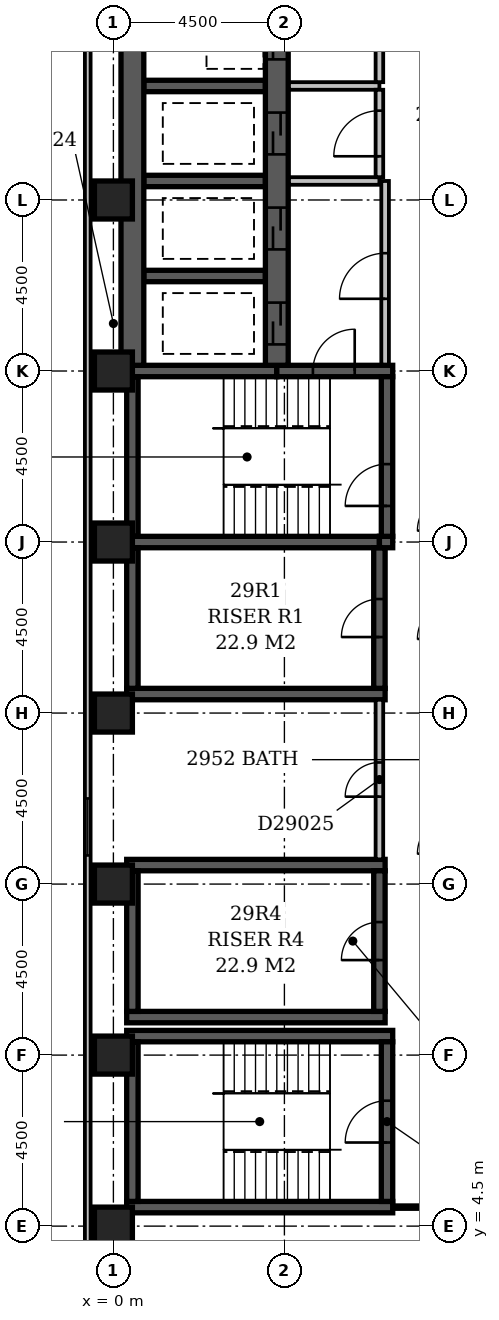
"""IFC4 building model, lengths in metres.
Left out: names, types, materials, properties, quantities, classifications, styles, units other than length and angle.
Written with IfcOpenShell. Run it as: python <this file> out.ifc"""

import sys

from ifc_helpers import new_model, si_unit, direction, frame, frame_2d, origin, origin_2d, place, context, subcontext, project, spatial, rectangle, extrude, element, fill, save


model = new_model("IFC4")
c1 = context("Model", 3, precision=1e-05, world=origin(), true_north=direction((0.0, 1.0)))
c2 = subcontext(c1, "Body", "Model", "MODEL_VIEW")
j1 = project(units=[si_unit("LENGTHUNIT", "METRE"), si_unit("PLANEANGLEUNIT", "RADIAN")], contexts=[c1])
p1 = place(None, origin())
s1 = spatial("IfcSite", under=j1, at=p1, CompositionType="ELEMENT")
p2 = place(p1, origin())
s2 = spatial("IfcBuilding", under=s1, at=p2, CompositionType="ELEMENT")
p3 = place(p2, frame((0.0, 0.0, 119.6)))
s3 = spatial("IfcBuildingStorey", under=s2, at=p3, CompositionType="ELEMENT", Elevation=119.6)
for number, where, z_axis, x_axis in (
    (1, (0.35, 5.0, -0.3), (0.0, 0.0, 1.0), (1.0, 0.0, 0.0)),
    (2, (0.35, 9.5, -0.3), (0.0, 0.0, 1.0), (1.0, 0.0, 0.0)),
):
    element("IfcWall", number, at=place(p3, frame(where, z_axis=z_axis, x_axis=x_axis)), inside=s3, PredefinedType="SHEAR", context=c2, shape_type="SweptSolid", body=[
        extrude(rectangle(XDim=7.0, YDim=0.3, at=frame_2d((3.5, 0.0))), origin(), (0.0, 0.0, 1.0), 3.6),
    ])
for number, where, z_axis, x_axis in (
    (3, (0.35, 10.0, -0.3), (0.0, 0.0, 1.0), (1.0, 0.0, 0.0)),
    (4, (0.35, 14.0, -0.3), (0.0, 0.0, 1.0), (1.0, 0.0, 0.0)),
    (5, (0.35, 18.5, -0.3), (0.0, 0.0, 1.0), (1.0, 0.0, 0.0)),
):
    element("IfcWall", number, at=place(p3, frame(where, z_axis=z_axis, x_axis=x_axis)), inside=s3, PredefinedType="SHEAR", context=c2, shape_type="SweptSolid", body=[
        extrude(rectangle(XDim=6.8, YDim=0.3, at=frame_2d((3.4, 0.0))), origin(), (0.0, 0.0, 1.0), 3.6),
    ])
p4 = place(p3, frame((0.35, 22.5, -0.3), z_axis=(0.0, 0.0, 1.0), x_axis=(1.0, 0.0, 0.0)))
e6 = element("IfcWall", 6, at=p4, inside=s3, PredefinedType="SHEAR", context=c2, shape_type="SweptSolid", body=[
    extrude(rectangle(XDim=6.65, YDim=0.3, at=frame_2d((3.325, 0.0))), origin(), (0.0, 0.0, 1.0), 3.6),
])
p5 = place(p3, frame((0.35, 27.0, -0.3), z_axis=(0.0, 0.0, 1.0), x_axis=(1.0, 0.0, 0.0)))
e7 = element("IfcWall", 7, at=p5, inside=s3, PredefinedType="SHEAR", context=c2, shape_type="SweptSolid", body=[
    extrude(rectangle(XDim=3.95, YDim=0.3, at=frame_2d((1.975, 0.0))), origin(), (0.0, 0.0, 1.0), 3.6),
])
p6 = place(p3, frame((0.5, 5.15, -0.3), z_axis=(0.0, 0.0, 1.0), x_axis=(0.0, 1.0, 0.0)))
e8 = element("IfcWall", 8, at=p6, inside=s3, PredefinedType="SHEAR", context=c2, shape_type="SweptSolid", body=[
    extrude(rectangle(XDim=4.2, YDim=0.3, at=frame_2d((2.1, 0.0))), origin(), (0.0, 0.0, 1.0), 3.6),
])
for number, where, z_axis, x_axis in (
    (9, (0.5, 10.15, -0.3), (0.0, 0.0, 1.0), (0.0, 1.0, 0.0)),
    (10, (0.5, 18.65, -0.3), (0.0, 0.0, 1.0), (0.0, 1.0, 0.0)),
):
    element("IfcWall", number, at=place(p3, frame(where, z_axis=z_axis, x_axis=x_axis)), inside=s3, PredefinedType="SHEAR", context=c2, shape_type="SweptSolid", body=[
        extrude(rectangle(XDim=3.7, YDim=0.3, at=frame_2d((1.85, 0.0))), origin(), (0.0, 0.0, 1.0), 3.6),
    ])
p7 = place(p3, frame((0.5, 22.65, -0.3), z_axis=(0.0, 0.0, 1.0), x_axis=(0.0, 1.0, 0.0)))
e11 = element("IfcWall", 11, at=p7, inside=s3, PredefinedType="SHEAR", context=c2, shape_type="SweptSolid", body=[
    extrude(rectangle(XDim=4.2, YDim=0.3, at=frame_2d((2.1, 0.0))), origin(), (0.0, 0.0, 1.0), 3.6),
])
p8 = place(p3, frame((0.5, 27.15, -0.3), z_axis=(0.0, 0.0, 1.0), x_axis=(0.0, 1.0, 0.0)))
e12 = element("IfcWall", 12, at=p8, inside=s3, PredefinedType="SHEAR", context=c2, shape_type="SweptSolid", body=[
    extrude(rectangle(XDim=22.05, YDim=0.6, at=frame_2d((11.025, 0.0))), origin(), (0.0, 0.0, 1.0), 3.6),
])
for number, where, z_axis, x_axis in (
    (13, (0.8, 29.5, -0.3), (0.0, 0.0, 1.0), (1.0, 0.0, 0.0)),
    (14, (0.8, 32.0, -0.3), (0.0, 0.0, 1.0), (1.0, 0.0, 0.0)),
    (15, (0.8, 34.5, -0.3), (0.0, 0.0, 1.0), (1.0, 0.0, 0.0)),
):
    element("IfcWall", number, at=place(p3, frame(where, z_axis=z_axis, x_axis=x_axis)), inside=s3, PredefinedType="SHEAR", context=c2, shape_type="SweptSolid", body=[
        extrude(rectangle(XDim=3.2, YDim=0.3, at=frame_2d((1.6, 0.0))), origin(), (0.0, 0.0, 1.0), 3.6),
    ])
p9 = place(p3, frame((4.3, 27.0, -0.3), z_axis=(0.0, 0.0, 1.0), x_axis=(1.0, 0.0, 0.0)))
e16 = element("IfcWall", 16, at=p9, inside=s3, PredefinedType="SHEAR", context=c2, shape_type="SweptSolid", body=[
    extrude(rectangle(XDim=3.05, YDim=0.3, at=frame_2d((1.525, 0.0))), origin(), (0.0, 0.0, 1.0), 3.6),
])
p10 = place(p9, frame((0.95, 0.0, 0.3)))
e17 = element("IfcOpeningElement", 17, at=p10, cuts=e16, PredefinedType="OPENING", context=c2, shape_type="SweptSolid", body=[
    extrude(rectangle(XDim=1.1, YDim=2.1, at=frame_2d((0.55, 1.05))), frame((0.0, 0.162, 0.0), z_axis=(0.0, -1.0, 0.0), x_axis=(1.0, 0.0, 0.0)), (0.0, 0.0, 1.0), 0.324),
])
p11 = place(p3, frame((4.3, 27.15, -0.3), z_axis=(0.0, 0.0, 1.0), x_axis=(0.0, 1.0, 0.0)))
e18 = element("IfcWall", 18, at=p11, inside=s3, PredefinedType="SHEAR", context=c2, shape_type="SweptSolid", body=[
    extrude(rectangle(XDim=22.05, YDim=0.6, at=frame_2d((11.025, 0.0))), origin(), (0.0, 0.0, 1.0), 3.6),
])
p12 = place(p11, frame((3.05, 0.0, 0.3)))
e19 = element("IfcOpeningElement", 19, at=p12, cuts=e18, PredefinedType="OPENING", context=c2, shape_type="SweptSolid", body=[
    extrude(rectangle(XDim=1.1, YDim=2.1, at=frame_2d((0.55, 1.05))), frame((0.0, 0.312, 0.0), z_axis=(0.0, -1.0, 0.0), x_axis=(1.0, 0.0, 0.0)), (0.0, 0.0, 1.0), 0.624),
])
p13 = place(p11, frame((0.55, 0.0, 0.3)))
e20 = element("IfcOpeningElement", 20, at=p13, cuts=e18, PredefinedType="OPENING", context=c2, shape_type="SweptSolid", body=[
    extrude(rectangle(XDim=1.1, YDim=2.1, at=frame_2d((0.55, 1.05))), frame((0.0, 0.312, 0.0), z_axis=(0.0, -1.0, 0.0), x_axis=(1.0, 0.0, 0.0)), (0.0, 0.0, 1.0), 0.624),
])
p14 = place(p11, frame((20.55, 0.0, 0.3)))
e21 = element("IfcOpeningElement", 21, at=p14, cuts=e18, PredefinedType="OPENING", context=c2, shape_type="SweptSolid", body=[
    extrude(rectangle(XDim=1.1, YDim=2.1, at=frame_2d((0.55, 1.05))), frame((0.0, 0.312, 0.0), z_axis=(0.0, -1.0, 0.0), x_axis=(1.0, 0.0, 0.0)), (0.0, 0.0, 1.0), 0.624),
])
p15 = place(p11, frame((18.05, 0.0, 0.3)))
e22 = element("IfcOpeningElement", 22, at=p15, cuts=e18, PredefinedType="OPENING", context=c2, shape_type="SweptSolid", body=[
    extrude(rectangle(XDim=1.1, YDim=2.1, at=frame_2d((0.55, 1.05))), frame((0.0, 0.312, 0.0), z_axis=(0.0, -1.0, 0.0), x_axis=(1.0, 0.0, 0.0)), (0.0, 0.0, 1.0), 0.624),
])
p16 = place(p11, frame((15.55, 0.0, 0.3)))
e23 = element("IfcOpeningElement", 23, at=p16, cuts=e18, PredefinedType="OPENING", context=c2, shape_type="SweptSolid", body=[
    extrude(rectangle(XDim=1.1, YDim=2.1, at=frame_2d((0.55, 1.05))), frame((0.0, 0.312, 0.0), z_axis=(0.0, -1.0, 0.0), x_axis=(1.0, 0.0, 0.0)), (0.0, 0.0, 1.0), 0.624),
])
p17 = place(p11, frame((13.05, 0.0, 0.3)))
e24 = element("IfcOpeningElement", 24, at=p17, cuts=e18, PredefinedType="OPENING", context=c2, shape_type="SweptSolid", body=[
    extrude(rectangle(XDim=1.1, YDim=2.1, at=frame_2d((0.55, 1.05))), frame((0.0, 0.312, 0.0), z_axis=(0.0, -1.0, 0.0), x_axis=(1.0, 0.0, 0.0)), (0.0, 0.0, 1.0), 0.624),
])
p18 = place(p11, frame((10.55, 0.0, 0.3)))
e25 = element("IfcOpeningElement", 25, at=p18, cuts=e18, PredefinedType="OPENING", context=c2, shape_type="SweptSolid", body=[
    extrude(rectangle(XDim=1.1, YDim=2.1, at=frame_2d((0.55, 1.05))), frame((0.0, 0.312, 0.0), z_axis=(0.0, -1.0, 0.0), x_axis=(1.0, 0.0, 0.0)), (0.0, 0.0, 1.0), 0.624),
])
p19 = place(p11, frame((8.05, 0.0, 0.3)))
e26 = element("IfcOpeningElement", 26, at=p19, cuts=e18, PredefinedType="OPENING", context=c2, shape_type="SweptSolid", body=[
    extrude(rectangle(XDim=1.1, YDim=2.1, at=frame_2d((0.55, 1.05))), frame((0.0, 0.312, 0.0), z_axis=(0.0, -1.0, 0.0), x_axis=(1.0, 0.0, 0.0)), (0.0, 0.0, 1.0), 0.624),
])
p20 = place(p11, frame((5.55, 0.0, 0.3)))
e27 = element("IfcOpeningElement", 27, at=p20, cuts=e18, PredefinedType="OPENING", context=c2, shape_type="SweptSolid", body=[
    extrude(rectangle(XDim=1.1, YDim=2.1, at=frame_2d((0.55, 1.05))), frame((0.0, 0.312, 0.0), z_axis=(0.0, -1.0, 0.0), x_axis=(1.0, 0.0, 0.0)), (0.0, 0.0, 1.0), 0.624),
])
p21 = place(p3, frame((7.0, 10.15, -0.3), z_axis=(0.0, 0.0, 1.0), x_axis=(0.0, 1.0, 0.0)))
e28 = element("IfcWall", 28, at=p21, inside=s3, PredefinedType="SHEAR", context=c2, shape_type="SweptSolid", body=[
    extrude(rectangle(XDim=3.7, YDim=0.3, at=frame_2d((1.85, 0.0))), origin(), (0.0, 0.0, 1.0), 3.6),
])
p22 = place(p21, frame((1.35, 0.0, 0.3)))
e29 = element("IfcOpeningElement", 29, at=p22, cuts=e28, PredefinedType="OPENING", context=c2, shape_type="SweptSolid", body=[
    extrude(rectangle(XDim=1.0, YDim=2.1, at=frame_2d((0.5, 1.05))), frame((0.0, 0.162, 0.0), z_axis=(0.0, -1.0, 0.0), x_axis=(1.0, 0.0, 0.0)), (0.0, 0.0, 1.0), 0.324),
])
p23 = place(p3, frame((7.0, 18.65, -0.3), z_axis=(0.0, 0.0, 1.0), x_axis=(0.0, 1.0, 0.0)))
e30 = element("IfcWall", 30, at=p23, inside=s3, PredefinedType="SHEAR", context=c2, shape_type="SweptSolid", body=[
    extrude(rectangle(XDim=3.7, YDim=0.3, at=frame_2d((1.85, 0.0))), origin(), (0.0, 0.0, 1.0), 3.6),
])
p24 = place(p23, frame((1.35, 0.0, 0.3)))
e31 = element("IfcOpeningElement", 31, at=p24, cuts=e30, PredefinedType="OPENING", context=c2, shape_type="SweptSolid", body=[
    extrude(rectangle(XDim=1.0, YDim=2.1, at=frame_2d((0.5, 1.05))), frame((0.0, 0.162, 0.0), z_axis=(0.0, -1.0, 0.0), x_axis=(1.0, 0.0, 0.0)), (0.0, 0.0, 1.0), 0.324),
])
p25 = place(p3, frame((7.0, 22.5, -0.3), z_axis=(0.0, 0.0, 1.0), x_axis=(1.0, 0.0, 0.0)))
e32 = element("IfcWall", 32, at=p25, inside=s3, PredefinedType="SHEAR", context=c2, shape_type="SweptSolid", body=[
    extrude(rectangle(XDim=0.35, YDim=0.3, at=frame_2d((0.175, 0.0))), origin(), (0.0, 0.0, 1.0), 3.6),
])
p26 = place(p3, frame((7.2, 5.15, -0.3), z_axis=(0.0, 0.0, 1.0), x_axis=(0.0, 1.0, 0.0)))
e33 = element("IfcWall", 33, at=p26, inside=s3, PredefinedType="SHEAR", context=c2, shape_type="SweptSolid", body=[
    extrude(rectangle(XDim=4.2, YDim=0.3, at=frame_2d((2.1, 0.0))), origin(), (0.0, 0.0, 1.0), 3.6),
])
p27 = place(p26, frame((1.55, 0.0, 0.3)))
e34 = element("IfcOpeningElement", 34, at=p27, cuts=e33, PredefinedType="OPENING", context=c2, shape_type="SweptSolid", body=[
    extrude(rectangle(XDim=1.1, YDim=2.1, at=frame_2d((0.55, 1.05))), frame((0.0, 0.162, 0.0), z_axis=(0.0, -1.0, 0.0), x_axis=(1.0, 0.0, 0.0)), (0.0, 0.0, 1.0), 0.324),
])
p28 = place(p3, frame((7.2, 22.65, -0.3), z_axis=(0.0, 0.0, 1.0), x_axis=(0.0, 1.0, 0.0)))
e35 = element("IfcWall", 35, at=p28, inside=s3, PredefinedType="SHEAR", context=c2, shape_type="SweptSolid", body=[
    extrude(rectangle(XDim=4.2, YDim=0.3, at=frame_2d((2.1, 0.0))), origin(), (0.0, 0.0, 1.0), 3.6),
])
p29 = place(p28, frame((0.8, 0.0, 0.3)))
e36 = element("IfcOpeningElement", 36, at=p29, cuts=e35, PredefinedType="OPENING", context=c2, shape_type="SweptSolid", body=[
    extrude(rectangle(XDim=1.1, YDim=2.1, at=frame_2d((0.55, 1.05))), frame((0.0, 0.162, 0.0), z_axis=(0.0, -1.0, 0.0), x_axis=(1.0, 0.0, 0.0)), (0.0, 0.0, 1.0), 0.324),
])
for number, where, z_axis, x_axis in (
    (37, (0.0, 4.5, -0.3), (0.0, 0.0, 1.0), (1.0, 0.0, 0.0)),
    (38, (0.0, 9.0, -0.3), (0.0, 0.0, 1.0), (1.0, 0.0, 0.0)),
    (39, (0.0, 13.5, -0.3), (0.0, 0.0, 1.0), (1.0, 0.0, 0.0)),
    (40, (0.0, 18.0, -0.3), (0.0, 0.0, 1.0), (1.0, 0.0, 0.0)),
    (41, (0.0, 22.5, -0.3), (0.0, 0.0, 1.0), (1.0, 0.0, 0.0)),
    (42, (0.0, 27.0, -0.3), (0.0, 0.0, 1.0), (1.0, 0.0, 0.0)),
    (43, (0.0, 31.5, -0.3), (0.0, 0.0, 1.0), (1.0, 0.0, 0.0)),
):
    element("IfcColumn", number, at=place(p3, frame(where, z_axis=z_axis, x_axis=x_axis)), inside=s3, PredefinedType="COLUMN", context=c2, shape_type="SweptSolid", body=[
        extrude(rectangle(XDim=1.0, YDim=1.0, at=origin_2d()), origin(), (0.0, 0.0, 1.0), 3.6),
    ])
p30 = place(p3, frame((-0.675, 59.1, 0.0), z_axis=(0.0, 0.0, 1.0), x_axis=(0.0, -1.0, 0.0)))
e44 = element("IfcWall", 44, at=p30, inside=s3, PredefinedType="STANDARD", context=c2, shape_type="SweptSolid", body=[
    extrude(rectangle(XDim=55.35, YDim=0.15, at=frame_2d((27.675, 0.0))), origin(), (0.0, 0.0, 1.0), 2.7),
])
p31 = place(p30, frame((43.347, 0.0, 0.6)))
e45 = element("IfcOpeningElement", 45, at=p31, cuts=e44, PredefinedType="OPENING", context=c2, shape_type="SweptSolid", body=[
    extrude(rectangle(XDim=1.5, YDim=1.8, at=frame_2d((0.75, 0.9))), frame((0.0, 0.087, 0.0), z_axis=(0.0, -1.0, 0.0), x_axis=(1.0, 0.0, 0.0)), (0.0, 0.0, 1.0), 0.174),
])
p32 = place(p3, frame((4.62, 34.5, 0.0), z_axis=(0.0, 0.0, 1.0), x_axis=(1.0, 0.0, 0.0)))
e46 = element("IfcWall", 46, at=p32, inside=s3, PredefinedType="PARTITIONING", context=c2, shape_type="SweptSolid", body=[
    extrude(rectangle(XDim=2.38, YDim=0.2, at=frame_2d((1.19, 0.0))), origin(), (0.0, 0.0, 1.0), 3.3),
])
p33 = place(p3, frame((7.0, 34.6, 0.0), z_axis=(0.0, 0.0, 1.0), x_axis=(0.0, 1.0, 0.0)))
e47 = element("IfcWall", 47, at=p33, inside=s3, PredefinedType="PARTITIONING", context=c2, shape_type="SweptSolid", body=[
    extrude(rectangle(XDim=14.9, YDim=0.2, at=frame_2d((7.45, 0.0))), origin(), (0.0, 0.0, 1.0), 3.3),
])
p34 = place(p33, frame((2.8, 0.0, 0.0)))
e48 = element("IfcOpeningElement", 48, at=p34, cuts=e47, PredefinedType="OPENING", context=c2, shape_type="SweptSolid", body=[
    extrude(rectangle(XDim=1.2, YDim=2.1, at=frame_2d((0.6, 1.05))), frame((0.0, 0.112, 0.0), z_axis=(0.0, -1.0, 0.0), x_axis=(1.0, 0.0, 0.0)), (0.0, 0.0, 1.0), 0.224),
])
p35 = place(p33, frame((9.8, 0.0, 0.0)))
e49 = element("IfcOpeningElement", 49, at=p35, cuts=e47, PredefinedType="OPENING", context=c2, shape_type="SweptSolid", body=[
    extrude(rectangle(XDim=1.2, YDim=2.1, at=frame_2d((0.6, 1.05))), frame((0.0, 0.112, 0.0), z_axis=(0.0, -1.0, 0.0), x_axis=(1.0, 0.0, 0.0)), (0.0, 0.0, 1.0), 0.224),
])
p36 = place(p3, frame((4.62, 32.0, 0.0), z_axis=(0.0, 0.0, 1.0), x_axis=(1.0, 0.0, 0.0)))
e50 = element("IfcWall", 50, at=p36, inside=s3, PredefinedType="PARTITIONING", context=c2, shape_type="SweptSolid", body=[
    extrude(rectangle(XDim=2.38, YDim=0.2, at=frame_2d((1.19, 0.0))), origin(), (0.0, 0.0, 1.0), 3.3),
])
p37 = place(p3, frame((7.0, 32.1, 0.0), z_axis=(0.0, 0.0, 1.0), x_axis=(0.0, 1.0, 0.0)))
e51 = element("IfcWall", 51, at=p37, inside=s3, PredefinedType="PARTITIONING", context=c2, shape_type="SweptSolid", body=[
    extrude(rectangle(XDim=2.3, YDim=0.2, at=frame_2d((1.15, 0.0))), origin(), (0.0, 0.0, 1.0), 3.3),
])
p38 = place(p37, frame((0.55, 0.0, 0.0)))
e52 = element("IfcOpeningElement", 52, at=p38, cuts=e51, PredefinedType="OPENING", context=c2, shape_type="SweptSolid", body=[
    extrude(rectangle(XDim=1.2, YDim=2.1, at=frame_2d((0.6, 1.05))), frame((0.0, 0.112, 0.0), z_axis=(0.0, -1.0, 0.0), x_axis=(1.0, 0.0, 0.0)), (0.0, 0.0, 1.0), 0.224),
])
p39 = place(p3, frame((7.15, 27.17, 0.0), z_axis=(0.0, 0.0, 1.0), x_axis=(0.0, 1.0, 0.0)))
e53 = element("IfcWall", 53, at=p39, inside=s3, PredefinedType="PARTITIONING", context=c2, shape_type="SweptSolid", body=[
    extrude(rectangle(XDim=4.83, YDim=0.2, at=frame_2d((2.415, 0.0))), origin(), (0.0, 0.0, 1.0), 3.3),
])
p40 = place(p39, frame((1.73, 0.0, 0.0)))
e54 = element("IfcOpeningElement", 54, at=p40, cuts=e53, PredefinedType="OPENING", context=c2, shape_type="SweptSolid", body=[
    extrude(rectangle(XDim=1.2, YDim=2.1, at=frame_2d((0.6, 1.05))), frame((0.0, 0.112, 0.0), z_axis=(0.0, -1.0, 0.0), x_axis=(1.0, 0.0, 0.0)), (0.0, 0.0, 1.0), 0.224),
])
p41 = place(p3, frame((0.0, 4.5, 0.0), z_axis=(0.0, 0.0, 1.0), x_axis=(0.0, 1.0, 0.0)))
e55 = element("IfcWall", 55, at=p41, inside=s3, PredefinedType="PARTITIONING", context=c2, shape_type="SweptSolid", body=[
    extrude(rectangle(XDim=0.5, YDim=0.1, at=frame_2d((0.25, 0.0))), origin(), (0.0, 0.0, 1.0), 2.7),
])
p42 = place(p3, frame((7.349, 5.0, 0.0), z_axis=(0.0, 0.0, 1.0), x_axis=(1.0, 0.0, 0.0)))
e56 = element("IfcWall", 56, at=p42, inside=s3, PredefinedType="PARTITIONING", context=c2, shape_type="SweptSolid", body=[
    extrude(rectangle(XDim=1.551, YDim=0.1, at=frame_2d((0.775, 0.0))), origin(), (0.0, 0.0, 1.0), 3.3),
])
p43 = place(p3, frame((7.0, 14.15, 0.0), z_axis=(0.0, 0.0, 1.0), x_axis=(0.0, 1.0, 0.0)))
e57 = element("IfcWall", 57, at=p43, inside=s3, PredefinedType="PARTITIONING", context=c2, shape_type="SweptSolid", body=[
    extrude(rectangle(XDim=4.2, YDim=0.2, at=frame_2d((2.1, 0.0))), origin(), (0.0, 0.0, 1.0), 3.3),
])
p44 = place(p43, frame((1.65, 0.0, 0.0)))
e58 = element("IfcOpeningElement", 58, at=p44, cuts=e57, PredefinedType="OPENING", context=c2, shape_type="SweptSolid", body=[
    extrude(rectangle(XDim=0.9, YDim=2.1, at=frame_2d((0.45, 1.05))), frame((0.0, 0.112, 0.0), z_axis=(0.0, -1.0, 0.0), x_axis=(1.0, 0.0, 0.0)), (0.0, 0.0, 1.0), 0.224),
])
p45 = place(p31, origin())
e59 = element("IfcWindow", 59, at=p45, inside=s3, PartitioningType="SINGLE_PANEL", PredefinedType="WINDOW", context=c2, shape_type="SweptSolid", body=[
    extrude(rectangle(XDim=1.5, YDim=1.8, at=frame_2d((0.75, 0.9))), frame((0.0, 0.03, 0.0), z_axis=(0.0, -1.0, 0.0), x_axis=(1.0, 0.0, 0.0)), (0.0, 0.0, 1.0), 0.06),
])
fill(e45, e59)
p46 = place(p40, origin())
e60 = element("IfcDoor", 60, at=p46, inside=s3, OperationType="SINGLE_SWING_LEFT", PredefinedType="DOOR", context=c2, shape_type="SweptSolid", body=[
    extrude(rectangle(XDim=1.2, YDim=2.1, at=frame_2d((0.6, 1.05))), frame((0.0, 0.025, 0.0), z_axis=(0.0, -1.0, 0.0), x_axis=(1.0, 0.0, 0.0)), (0.0, 0.0, 1.0), 0.05),
])
fill(e54, e60)
p47 = place(p12, origin())
e61 = element("IfcDoor", 61, at=p47, inside=s3, OperationType="SLIDING_TO_LEFT", PredefinedType="DOOR", context=c2, shape_type="SweptSolid", body=[
    extrude(rectangle(XDim=1.1, YDim=2.1, at=frame_2d((0.55, 1.05))), frame((0.0, 0.025, 0.0), z_axis=(0.0, -1.0, 0.0), x_axis=(1.0, 0.0, 0.0)), (0.0, 0.0, 1.0), 0.05),
])
fill(e19, e61)
p48 = place(p13, origin())
e62 = element("IfcDoor", 62, at=p48, inside=s3, OperationType="SLIDING_TO_LEFT", PredefinedType="DOOR", context=c2, shape_type="SweptSolid", body=[
    extrude(rectangle(XDim=1.1, YDim=2.1, at=frame_2d((0.55, 1.05))), frame((0.0, 0.025, 0.0), z_axis=(0.0, -1.0, 0.0), x_axis=(1.0, 0.0, 0.0)), (0.0, 0.0, 1.0), 0.05),
])
fill(e20, e62)
p49 = place(p19, origin())
e63 = element("IfcDoor", 63, at=p49, inside=s3, OperationType="SLIDING_TO_LEFT", PredefinedType="DOOR", context=c2, shape_type="SweptSolid", body=[
    extrude(rectangle(XDim=1.1, YDim=2.1, at=frame_2d((0.55, 1.05))), frame((0.0, 0.025, 0.0), z_axis=(0.0, -1.0, 0.0), x_axis=(1.0, 0.0, 0.0)), (0.0, 0.0, 1.0), 0.05),
])
fill(e26, e63)
p50 = place(p38, origin())
e64 = element("IfcDoor", 64, at=p50, inside=s3, OperationType="SINGLE_SWING_LEFT", PredefinedType="DOOR", context=c2, shape_type="SweptSolid", body=[
    extrude(rectangle(XDim=1.2, YDim=2.1, at=frame_2d((0.6, 1.05))), frame((0.0, 0.025, 0.0), z_axis=(0.0, -1.0, 0.0), x_axis=(1.0, 0.0, 0.0)), (0.0, 0.0, 1.0), 0.05),
])
fill(e52, e64)
p51 = place(p20, origin())
e65 = element("IfcDoor", 65, at=p51, inside=s3, OperationType="SLIDING_TO_LEFT", PredefinedType="DOOR", context=c2, shape_type="SweptSolid", body=[
    extrude(rectangle(XDim=1.1, YDim=2.1, at=frame_2d((0.55, 1.05))), frame((0.0, 0.025, 0.0), z_axis=(0.0, -1.0, 0.0), x_axis=(1.0, 0.0, 0.0)), (0.0, 0.0, 1.0), 0.05),
])
fill(e27, e65)
p52 = place(p24, origin())
e66 = element("IfcDoor", 66, at=p52, inside=s3, OperationType="SINGLE_SWING_LEFT", PredefinedType="DOOR", context=c2, shape_type="SweptSolid", body=[
    extrude(rectangle(XDim=1.0, YDim=2.1, at=frame_2d((0.5, 1.05))), frame((0.0, 0.025, 0.0), z_axis=(0.0, -1.0, 0.0), x_axis=(1.0, 0.0, 0.0)), (0.0, 0.0, 1.0), 0.05),
])
fill(e31, e66)
p53 = place(p22, origin())
e67 = element("IfcDoor", 67, at=p53, inside=s3, OperationType="SINGLE_SWING_LEFT", PredefinedType="DOOR", context=c2, shape_type="SweptSolid", body=[
    extrude(rectangle(XDim=1.0, YDim=2.1, at=frame_2d((0.5, 1.05))), frame((0.0, 0.025, 0.0), z_axis=(0.0, -1.0, 0.0), x_axis=(1.0, 0.0, 0.0)), (0.0, 0.0, 1.0), 0.05),
])
fill(e29, e67)
p54 = place(p10, frame((1.1, 0.0, 0.0), z_axis=(0.0, 0.0, 1.0), x_axis=(-1.0, 0.0, 0.0)))
e68 = element("IfcDoor", 68, at=p54, inside=s3, OperationType="SINGLE_SWING_LEFT", PredefinedType="DOOR", context=c2, shape_type="SweptSolid", body=[
    extrude(rectangle(XDim=1.1, YDim=2.1, at=frame_2d((0.55, 1.05))), frame((0.0, 0.025, 0.0), z_axis=(0.0, -1.0, 0.0), x_axis=(1.0, 0.0, 0.0)), (0.0, 0.0, 1.0), 0.05),
])
fill(e17, e68)
p55 = place(p29, origin())
e69 = element("IfcDoor", 69, at=p55, inside=s3, OperationType="SINGLE_SWING_LEFT", PredefinedType="DOOR", context=c2, shape_type="SweptSolid", body=[
    extrude(rectangle(XDim=1.1, YDim=2.1, at=frame_2d((0.55, 1.05))), frame((0.0, 0.025, 0.0), z_axis=(0.0, -1.0, 0.0), x_axis=(1.0, 0.0, 0.0)), (0.0, 0.0, 1.0), 0.05),
])
fill(e36, e69)
p56 = place(p27, origin())
e70 = element("IfcDoor", 70, at=p56, inside=s3, OperationType="SINGLE_SWING_LEFT", PredefinedType="DOOR", context=c2, shape_type="SweptSolid", body=[
    extrude(rectangle(XDim=1.1, YDim=2.1, at=frame_2d((0.55, 1.05))), frame((0.0, 0.025, 0.0), z_axis=(0.0, -1.0, 0.0), x_axis=(1.0, 0.0, 0.0)), (0.0, 0.0, 1.0), 0.05),
])
fill(e34, e70)
p57 = place(p44, origin())
e71 = element("IfcDoor", 71, at=p57, inside=s3, OperationType="SINGLE_SWING_LEFT", PredefinedType="DOOR", context=c2, shape_type="SweptSolid", body=[
    extrude(rectangle(XDim=0.9, YDim=2.1, at=frame_2d((0.45, 1.05))), frame((0.0, 0.025, 0.0), z_axis=(0.0, -1.0, 0.0), x_axis=(1.0, 0.0, 0.0)), (0.0, 0.0, 1.0), 0.05),
])
fill(e58, e71)
save(model, sys.argv[1])
